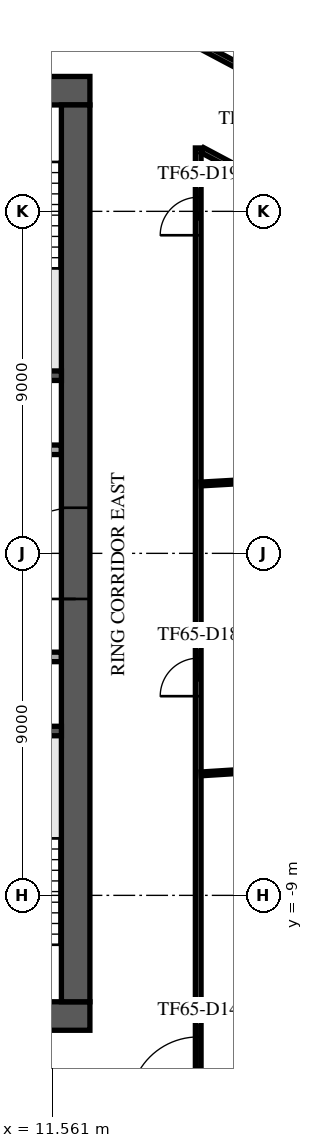
"""IFC4 building model, lengths in metres.
Left out: names, types, materials, properties, quantities, classifications, styles, units other than length and angle.
Written with IfcOpenShell. Run it as: python <this file> out.ifc"""

import sys

from ifc_helpers import new_model, si_unit, direction, frame, frame_2d, origin, place, context, subcontext, project, spatial, rectangle, extrude, element, fill, save


model = new_model("IFC4")
c1 = context("Model", 3, precision=1e-05, world=origin(), true_north=direction((0.0, 1.0)))
c2 = subcontext(c1, "Body", "Model", "MODEL_VIEW")
j1 = project(units=[si_unit("LENGTHUNIT", "METRE"), si_unit("PLANEANGLEUNIT", "RADIAN")], contexts=[c1])
p1 = place(None, origin())
s1 = spatial("IfcSite", under=j1, at=p1, CompositionType="ELEMENT")
p2 = place(p1, origin())
s2 = spatial("IfcBuilding", under=s1, at=p2, CompositionType="ELEMENT")
p3 = place(p2, frame((0.0, 0.0, 274.9)))
s3 = spatial("IfcBuildingStorey", under=s2, at=p3, CompositionType="ELEMENT", Elevation=274.9)
p4 = place(p3, frame((-12.55, 12.175, 0.0), z_axis=(0.0, 0.0, 1.0), x_axis=(1.0, 0.0, 0.0)))
e1 = element("IfcWall", 1, at=p4, inside=s3, PredefinedType="SHEAR", context=c2, shape_type="SweptSolid", body=[
    extrude(rectangle(XDim=25.1, YDim=0.75, at=frame_2d((12.55, 0.0))), origin(), (0.0, 0.0, 1.0), 3.64),
])
p5 = place(p4, frame((11.35, 0.0, 0.0)))
e2 = element("IfcOpeningElement", 2, at=p5, cuts=e1, PredefinedType="OPENING", context=c2, shape_type="SweptSolid", body=[
    extrude(rectangle(XDim=2.4, YDim=2.4, at=frame_2d((1.2, 1.2))), frame((0.0, 0.385, 0.0), z_axis=(0.0, -1.0, 0.0), x_axis=(1.0, 0.0, 0.0)), (0.0, 0.0, 1.0), 0.77),
])
p6 = place(p4, frame((22.175, 0.0, 0.0)))
e3 = element("IfcOpeningElement", 3, at=p6, cuts=e1, PredefinedType="OPENING", context=c2, shape_type="SweptSolid", body=[
    extrude(rectangle(XDim=1.2, YDim=2.1, at=frame_2d((0.6, 1.05))), frame((0.0, 0.385, 0.0), z_axis=(0.0, -1.0, 0.0), x_axis=(1.0, 0.0, 0.0)), (0.0, 0.0, 1.0), 0.77),
])
p7 = place(p4, frame((1.15, 0.0, 0.0)))
e4 = element("IfcOpeningElement", 4, at=p7, cuts=e1, PredefinedType="OPENING", context=c2, shape_type="SweptSolid", body=[
    extrude(rectangle(XDim=1.0, YDim=2.1, at=frame_2d((0.5, 1.05))), frame((0.0, 0.385, 0.0), z_axis=(0.0, -1.0, 0.0), x_axis=(1.0, 0.0, 0.0)), (0.0, 0.0, 1.0), 0.77),
])
p8 = place(p3, frame((-12.55, -12.175, 0.0), z_axis=(0.0, 0.0, 1.0), x_axis=(1.0, 0.0, 0.0)))
e5 = element("IfcWall", 5, at=p8, inside=s3, PredefinedType="SHEAR", context=c2, shape_type="SweptSolid", body=[
    extrude(rectangle(XDim=25.1, YDim=0.75, at=frame_2d((12.55, 0.0))), origin(), (0.0, 0.0, 1.0), 3.64),
])
p9 = place(p8, frame((7.45, 0.0, 0.0)))
e6 = element("IfcOpeningElement", 6, at=p9, cuts=e5, PredefinedType="OPENING", context=c2, shape_type="SweptSolid", body=[
    extrude(rectangle(XDim=2.0, YDim=2.1, at=frame_2d((1.0, 1.05))), frame((0.0, 0.385, 0.0), z_axis=(0.0, -1.0, 0.0), x_axis=(1.0, 0.0, 0.0)), (0.0, 0.0, 1.0), 0.77),
])
p10 = place(p8, frame((17.575, 0.0, 0.0)))
e7 = element("IfcOpeningElement", 7, at=p10, cuts=e5, PredefinedType="OPENING", context=c2, shape_type="SweptSolid", body=[
    extrude(rectangle(XDim=1.2, YDim=2.1, at=frame_2d((0.6, 1.05))), frame((0.0, 0.385, 0.0), z_axis=(0.0, -1.0, 0.0), x_axis=(1.0, 0.0, 0.0)), (0.0, 0.0, 1.0), 0.77),
])
p11 = place(p8, frame((1.725, 0.0, 0.0)))
e8 = element("IfcOpeningElement", 8, at=p11, cuts=e5, PredefinedType="OPENING", context=c2, shape_type="SweptSolid", body=[
    extrude(rectangle(XDim=1.2, YDim=2.1, at=frame_2d((0.6, 1.05))), frame((0.0, 0.385, 0.0), z_axis=(0.0, -1.0, 0.0), x_axis=(1.0, 0.0, 0.0)), (0.0, 0.0, 1.0), 0.77),
])
p12 = place(p8, frame((22.175, 0.0, 0.0)))
e9 = element("IfcOpeningElement", 9, at=p12, cuts=e5, PredefinedType="OPENING", context=c2, shape_type="SweptSolid", body=[
    extrude(rectangle(XDim=1.2, YDim=2.1, at=frame_2d((0.6, 1.05))), frame((0.0, 0.385, 0.0), z_axis=(0.0, -1.0, 0.0), x_axis=(1.0, 0.0, 0.0)), (0.0, 0.0, 1.0), 0.77),
])
p13 = place(p3, frame((12.175, -11.8, 0.0), z_axis=(0.0, 0.0, 1.0), x_axis=(0.0, 1.0, 0.0)))
e10 = element("IfcWall", 10, at=p13, inside=s3, PredefinedType="SHEAR", context=c2, shape_type="SweptSolid", body=[
    extrude(rectangle(XDim=23.6, YDim=0.75, at=frame_2d((11.8, 0.0))), origin(), (0.0, 0.0, 1.0), 3.64),
])
p14 = place(p13, frame((10.6, 0.0, 0.0)))
e11 = element("IfcOpeningElement", 11, at=p14, cuts=e10, PredefinedType="OPENING", context=c2, shape_type="SweptSolid", body=[
    extrude(rectangle(XDim=2.4, YDim=2.4, at=frame_2d((1.2, 1.2))), frame((0.0, 0.385, 0.0), z_axis=(0.0, -1.0, 0.0), x_axis=(1.0, 0.0, 0.0)), (0.0, 0.0, 1.0), 0.77),
])
for number, where, z_axis, x_axis in (
    (12, (8.65, 4.675, 0.0), (0.0, 0.0, 1.0), (1.0, 0.0, 0.0)),
    (13, (8.65, -4.675, 0.0), (0.0, 0.0, 1.0), (1.0, 0.0, 0.0)),
):
    element("IfcWall", number, at=place(p3, frame(where, z_axis=z_axis, x_axis=x_axis)), inside=s3, PredefinedType="SOLIDWALL", context=c2, shape_type="SweptSolid", body=[
        extrude(rectangle(XDim=3.15, YDim=0.25, at=frame_2d((1.575, 0.0))), origin(), (0.0, 0.0, 1.0), 3.64),
    ])
p15 = place(p3, frame((5.63, -2.725, 0.0), z_axis=(0.0, 0.0, 1.0), x_axis=(1.0, 0.0, 0.0)))
e14 = element("IfcWall", 14, at=p15, inside=s3, PredefinedType="PARTITIONING", context=c2, shape_type="SweptSolid", body=[
    extrude(rectangle(XDim=6.165, YDim=0.25, at=frame_2d((3.083, 0.0))), origin(), (0.0, 0.0, 1.0), 3.64),
])
p16 = place(p15, frame((0.745, 0.0, 0.0)))
e15 = element("IfcOpeningElement", 15, at=p16, cuts=e14, PredefinedType="OPENING", context=c2, shape_type="SweptSolid", body=[
    extrude(rectangle(XDim=1.0, YDim=2.1, at=frame_2d((0.5, 1.05))), frame((0.0, 0.135, 0.0), z_axis=(0.0, -1.0, 0.0), x_axis=(1.0, 0.0, 0.0)), (0.0, 0.0, 1.0), 0.27),
])
p17 = place(p15, frame((3.92, 0.0, 0.0)))
e16 = element("IfcOpeningElement", 16, at=p17, cuts=e14, PredefinedType="OPENING", context=c2, shape_type="SweptSolid", body=[
    extrude(rectangle(XDim=0.9, YDim=2.1, at=frame_2d((0.45, 1.05))), frame((0.0, 0.135, 0.0), z_axis=(0.0, -1.0, 0.0), x_axis=(1.0, 0.0, 0.0)), (0.0, 0.0, 1.0), 0.27),
])
p18 = place(p3, frame((-11.795, 2.725, 0.0), z_axis=(0.0, 0.0, 1.0), x_axis=(1.0, 0.0, 0.0)))
e17 = element("IfcWall", 17, at=p18, inside=s3, PredefinedType="PARTITIONING", context=c2, shape_type="SweptSolid", body=[
    extrude(rectangle(XDim=23.59, YDim=0.25, at=frame_2d((11.795, 0.0))), origin(), (0.0, 0.0, 1.0), 3.64),
])
p19 = place(p18, frame((21.345, 0.0, 0.0)))
e18 = element("IfcOpeningElement", 18, at=p19, cuts=e17, PredefinedType="OPENING", context=c2, shape_type="SweptSolid", body=[
    extrude(rectangle(XDim=0.9, YDim=2.1, at=frame_2d((0.45, 1.05))), frame((0.0, 0.135, 0.0), z_axis=(0.0, -1.0, 0.0), x_axis=(1.0, 0.0, 0.0)), (0.0, 0.0, 1.0), 0.27),
])
p20 = place(p18, frame((1.345, 0.0, 0.0)))
e19 = element("IfcOpeningElement", 19, at=p20, cuts=e17, PredefinedType="OPENING", context=c2, shape_type="SweptSolid", body=[
    extrude(rectangle(XDim=0.9, YDim=2.1, at=frame_2d((0.45, 1.05))), frame((0.0, 0.135, 0.0), z_axis=(0.0, -1.0, 0.0), x_axis=(1.0, 0.0, 0.0)), (0.0, 0.0, 1.0), 0.27),
])
p21 = place(p18, frame((4.32, 0.0, 0.0)))
e20 = element("IfcOpeningElement", 20, at=p21, cuts=e17, PredefinedType="OPENING", context=c2, shape_type="SweptSolid", body=[
    extrude(rectangle(XDim=1.2, YDim=2.1, at=frame_2d((0.6, 1.05))), frame((0.0, 0.135, 0.0), z_axis=(0.0, -1.0, 0.0), x_axis=(1.0, 0.0, 0.0)), (0.0, 0.0, 1.0), 0.27),
])
p22 = place(p18, frame((15.42, 0.0, 0.0)))
e21 = element("IfcOpeningElement", 21, at=p22, cuts=e17, PredefinedType="OPENING", context=c2, shape_type="SweptSolid", body=[
    extrude(rectangle(XDim=1.0, YDim=2.1, at=frame_2d((0.5, 1.05))), frame((0.0, 0.135, 0.0), z_axis=(0.0, -1.0, 0.0), x_axis=(1.0, 0.0, 0.0)), (0.0, 0.0, 1.0), 0.27),
])
p23 = place(p3, frame((9.233, -32.479, 0.0), z_axis=(0.0, 0.0, 1.0), x_axis=(0.469468429065, 0.882949259081, 0.0)))
e22 = element("IfcWall", 22, at=p23, inside=s3, PredefinedType="STANDARD", context=c2, shape_type="SweptSolid", body=[
    extrude(rectangle(XDim=48.686, YDim=0.6, at=frame_2d((24.343, 0.0))), origin(), (0.0, 0.0, 1.0), 3.64),
])
p24 = place(p23, frame((1.213, 0.0, 0.9)))
e23 = element("IfcOpeningElement", 23, at=p24, cuts=e22, PredefinedType="OPENING", context=c2, shape_type="SweptSolid", body=[
    extrude(rectangle(XDim=2.0, YDim=2.1, at=frame_2d((1.0, 1.05))), frame((0.0, 0.31, 0.0), z_axis=(0.0, -1.0, 0.0), x_axis=(1.0, 0.0, 0.0)), (0.0, 0.0, 1.0), 0.62),
])
p25 = place(p23, frame((5.639, 0.0, 0.9)))
e24 = element("IfcOpeningElement", 24, at=p25, cuts=e22, PredefinedType="OPENING", context=c2, shape_type="SweptSolid", body=[
    extrude(rectangle(XDim=2.0, YDim=2.1, at=frame_2d((1.0, 1.05))), frame((0.0, 0.31, 0.0), z_axis=(0.0, -1.0, 0.0), x_axis=(1.0, 0.0, 0.0)), (0.0, 0.0, 1.0), 0.62),
])
p26 = place(p23, frame((10.065, 0.0, 0.9)))
e25 = element("IfcOpeningElement", 25, at=p26, cuts=e22, PredefinedType="OPENING", context=c2, shape_type="SweptSolid", body=[
    extrude(rectangle(XDim=2.0, YDim=2.1, at=frame_2d((1.0, 1.05))), frame((0.0, 0.31, 0.0), z_axis=(0.0, -1.0, 0.0), x_axis=(1.0, 0.0, 0.0)), (0.0, 0.0, 1.0), 0.62),
])
p27 = place(p23, frame((14.491, 0.0, 0.9)))
e26 = element("IfcOpeningElement", 26, at=p27, cuts=e22, PredefinedType="OPENING", context=c2, shape_type="SweptSolid", body=[
    extrude(rectangle(XDim=2.0, YDim=2.1, at=frame_2d((1.0, 1.05))), frame((0.0, 0.31, 0.0), z_axis=(0.0, -1.0, 0.0), x_axis=(1.0, 0.0, 0.0)), (0.0, 0.0, 1.0), 0.62),
])
p28 = place(p23, frame((18.917, 0.0, 0.9)))
e27 = element("IfcOpeningElement", 27, at=p28, cuts=e22, PredefinedType="OPENING", context=c2, shape_type="SweptSolid", body=[
    extrude(rectangle(XDim=2.0, YDim=2.1, at=frame_2d((1.0, 1.05))), frame((0.0, 0.31, 0.0), z_axis=(0.0, -1.0, 0.0), x_axis=(1.0, 0.0, 0.0)), (0.0, 0.0, 1.0), 0.62),
])
p29 = place(p23, frame((23.343, 0.0, 0.9)))
e28 = element("IfcOpeningElement", 28, at=p29, cuts=e22, PredefinedType="OPENING", context=c2, shape_type="SweptSolid", body=[
    extrude(rectangle(XDim=2.0, YDim=2.1, at=frame_2d((1.0, 1.05))), frame((0.0, 0.31, 0.0), z_axis=(0.0, -1.0, 0.0), x_axis=(1.0, 0.0, 0.0)), (0.0, 0.0, 1.0), 0.62),
])
p30 = place(p23, frame((27.769, 0.0, 0.9)))
e29 = element("IfcOpeningElement", 29, at=p30, cuts=e22, PredefinedType="OPENING", context=c2, shape_type="SweptSolid", body=[
    extrude(rectangle(XDim=2.0, YDim=2.1, at=frame_2d((1.0, 1.05))), frame((0.0, 0.31, 0.0), z_axis=(0.0, -1.0, 0.0), x_axis=(1.0, 0.0, 0.0)), (0.0, 0.0, 1.0), 0.62),
])
p31 = place(p23, frame((32.195, 0.0, 0.9)))
e30 = element("IfcOpeningElement", 30, at=p31, cuts=e22, PredefinedType="OPENING", context=c2, shape_type="SweptSolid", body=[
    extrude(rectangle(XDim=2.0, YDim=2.1, at=frame_2d((1.0, 1.05))), frame((0.0, 0.31, 0.0), z_axis=(0.0, -1.0, 0.0), x_axis=(1.0, 0.0, 0.0)), (0.0, 0.0, 1.0), 0.62),
])
p32 = place(p23, frame((36.621, 0.0, 0.9)))
e31 = element("IfcOpeningElement", 31, at=p32, cuts=e22, PredefinedType="OPENING", context=c2, shape_type="SweptSolid", body=[
    extrude(rectangle(XDim=2.0, YDim=2.1, at=frame_2d((1.0, 1.05))), frame((0.0, 0.31, 0.0), z_axis=(0.0, -1.0, 0.0), x_axis=(1.0, 0.0, 0.0)), (0.0, 0.0, 1.0), 0.62),
])
p33 = place(p23, frame((41.047, 0.0, 0.9)))
e32 = element("IfcOpeningElement", 32, at=p33, cuts=e22, PredefinedType="OPENING", context=c2, shape_type="SweptSolid", body=[
    extrude(rectangle(XDim=2.0, YDim=2.1, at=frame_2d((1.0, 1.05))), frame((0.0, 0.31, 0.0), z_axis=(0.0, -1.0, 0.0), x_axis=(1.0, 0.0, 0.0)), (0.0, 0.0, 1.0), 0.62),
])
p34 = place(p23, frame((45.473, 0.0, 0.9)))
e33 = element("IfcOpeningElement", 33, at=p34, cuts=e22, PredefinedType="OPENING", context=c2, shape_type="SweptSolid", body=[
    extrude(rectangle(XDim=2.0, YDim=2.1, at=frame_2d((1.0, 1.05))), frame((0.0, 0.31, 0.0), z_axis=(0.0, -1.0, 0.0), x_axis=(1.0, 0.0, 0.0)), (0.0, 0.0, 1.0), 0.62),
])
p35 = place(p3, frame((-8.385, 26.033, 0.0), z_axis=(0.0, 0.0, 1.0), x_axis=(0.882949433839, -0.46946810039, 0.0)))
e34 = element("IfcWall", 34, at=p35, inside=s3, PredefinedType="PARTITIONING", context=c2, shape_type="SweptSolid", body=[
    extrude(rectangle(XDim=39.325, YDim=0.15, at=frame_2d((19.662, 0.0))), origin(), (0.0, 0.0, 1.0), 3.04),
])
p36 = place(p35, frame((10.622, 0.0, 0.0)))
e35 = element("IfcOpeningElement", 35, at=p36, cuts=e34, PredefinedType="OPENING", context=c2, shape_type="SweptSolid", body=[
    extrude(rectangle(XDim=1.0, YDim=2.1, at=frame_2d((0.5, 1.05))), frame((0.0, 0.085, 0.0), z_axis=(0.0, -1.0, 0.0), x_axis=(1.0, 0.0, 0.0)), (0.0, 0.0, 1.0), 0.17),
])
p37 = place(p35, frame((16.615, 0.0, 0.0)))
e36 = element("IfcOpeningElement", 36, at=p37, cuts=e34, PredefinedType="OPENING", context=c2, shape_type="SweptSolid", body=[
    extrude(rectangle(XDim=1.0, YDim=2.1, at=frame_2d((0.5, 1.05))), frame((0.0, 0.085, 0.0), z_axis=(0.0, -1.0, 0.0), x_axis=(1.0, 0.0, 0.0)), (0.0, 0.0, 1.0), 0.17),
])
p38 = place(p35, frame((28.254, 0.0, 0.0)))
e37 = element("IfcOpeningElement", 37, at=p38, cuts=e34, PredefinedType="OPENING", context=c2, shape_type="SweptSolid", body=[
    extrude(rectangle(XDim=1.0, YDim=2.1, at=frame_2d((0.5, 1.05))), frame((0.0, 0.085, 0.0), z_axis=(0.0, -1.0, 0.0), x_axis=(1.0, 0.0, 0.0)), (0.0, 0.0, 1.0), 0.17),
])
p39 = place(p3, frame((15.4, -15.325, 0.0), z_axis=(0.0, 0.0, 1.0), x_axis=(0.0, 1.0, 0.0)))
e38 = element("IfcWall", 38, at=p39, inside=s3, PredefinedType="PARTITIONING", context=c2, shape_type="SweptSolid", body=[
    extrude(rectangle(XDim=25.993, YDim=0.15, at=frame_2d((12.997, 0.0))), origin(), (0.0, 0.0, 1.0), 3.24),
])
p40 = place(p39, frame((0.8, 0.0, 0.0)))
e39 = element("IfcOpeningElement", 39, at=p40, cuts=e38, PredefinedType="OPENING", context=c2, shape_type="SweptSolid", body=[
    extrude(rectangle(XDim=1.8, YDim=2.1, at=frame_2d((0.9, 1.05))), frame((0.0, 0.085, 0.0), z_axis=(0.0, -1.0, 0.0), x_axis=(1.0, 0.0, 0.0)), (0.0, 0.0, 1.0), 0.17),
])
p41 = place(p39, frame((11.567, 0.0, 0.0)))
e40 = element("IfcOpeningElement", 40, at=p41, cuts=e38, PredefinedType="OPENING", context=c2, shape_type="SweptSolid", body=[
    extrude(rectangle(XDim=1.0, YDim=2.1, at=frame_2d((0.5, 1.05))), frame((0.0, 0.085, 0.0), z_axis=(0.0, -1.0, 0.0), x_axis=(1.0, 0.0, 0.0)), (0.0, 0.0, 1.0), 0.17),
])
p42 = place(p39, frame((23.696, 0.0, 0.0)))
e41 = element("IfcOpeningElement", 41, at=p42, cuts=e38, PredefinedType="OPENING", context=c2, shape_type="SweptSolid", body=[
    extrude(rectangle(XDim=1.0, YDim=2.1, at=frame_2d((0.5, 1.05))), frame((0.0, 0.085, 0.0), z_axis=(0.0, -1.0, 0.0), x_axis=(1.0, 0.0, 0.0)), (0.0, 0.0, 1.0), 0.17),
])
p43 = place(p3, frame((15.51, 10.609, 0.0), z_axis=(0.0, 0.0, 1.0), x_axis=(0.882945895242, -0.469474755525, 0.0)))
e42 = element("IfcWall", 42, at=p43, inside=s3, PredefinedType="PARTITIONING", context=c2, shape_type="SweptSolid", body=[
    extrude(rectangle(XDim=10.986, YDim=0.15, at=frame_2d((5.493, 0.0))), origin(), (0.0, 0.0, 1.0), 3.24),
])
p44 = place(p3, frame((15.478, -5.803, 0.0), z_axis=(0.0, 0.0, 1.0), x_axis=(0.9980255857, 0.062808680043, 0.0)))
e43 = element("IfcWall", 43, at=p44, inside=s3, PredefinedType="PARTITIONING", context=c2, shape_type="SweptSolid", body=[
    extrude(rectangle(XDim=7.875, YDim=0.1, at=frame_2d((3.938, 0.0))), origin(), (0.0, 0.0, 1.0), 3.04),
])
p45 = place(p3, frame((15.478, 1.825, 0.0), z_axis=(0.0, 0.0, 1.0), x_axis=(0.998373479071, 0.057012246819, 0.0)))
e44 = element("IfcWall", 44, at=p45, inside=s3, PredefinedType="PARTITIONING", context=c2, shape_type="SweptSolid", body=[
    extrude(rectangle(XDim=12.037, YDim=0.1, at=frame_2d((6.019, 0.0))), origin(), (0.0, 0.0, 1.0), 3.04),
])
p46 = place(p14, origin())
e45 = element("IfcDoor", 45, at=p46, inside=s3, OperationType="SINGLE_SWING_LEFT", PredefinedType="DOOR", context=c2, shape_type="SweptSolid", body=[
    extrude(rectangle(XDim=2.4, YDim=2.4, at=frame_2d((1.2, 1.2))), frame((0.0, 0.025, 0.0), z_axis=(0.0, -1.0, 0.0), x_axis=(1.0, 0.0, 0.0)), (0.0, 0.0, 1.0), 0.05),
])
fill(e11, e45)
p47 = place(p40, frame((1.8, 0.0, 0.0), z_axis=(0.0, 0.0, 1.0), x_axis=(-1.0, 0.0, 0.0)))
e46 = element("IfcDoor", 46, at=p47, inside=s3, OperationType="DOUBLE_DOOR_SINGLE_SWING", PredefinedType="DOOR", context=c2, shape_type="SweptSolid", body=[
    extrude(rectangle(XDim=1.8, YDim=2.1, at=frame_2d((0.9, 1.05))), frame((0.0, 0.025, 0.0), z_axis=(0.0, -1.0, 0.0), x_axis=(1.0, 0.0, 0.0)), (0.0, 0.0, 1.0), 0.05),
])
fill(e39, e46)
p48 = place(p41, frame((1.0, 0.0, 0.0), z_axis=(0.0, 0.0, 1.0), x_axis=(-1.0, 0.0, 0.0)))
e47 = element("IfcDoor", 47, at=p48, inside=s3, OperationType="SINGLE_SWING_RIGHT", PredefinedType="DOOR", context=c2, shape_type="SweptSolid", body=[
    extrude(rectangle(XDim=1.0, YDim=2.1, at=frame_2d((0.5, 1.05))), frame((0.0, 0.025, 0.0), z_axis=(0.0, -1.0, 0.0), x_axis=(1.0, 0.0, 0.0)), (0.0, 0.0, 1.0), 0.05),
])
fill(e40, e47)
p49 = place(p42, frame((1.0, 0.0, 0.0), z_axis=(0.0, 0.0, 1.0), x_axis=(-1.0, 0.0, 0.0)))
e48 = element("IfcDoor", 48, at=p49, inside=s3, OperationType="SINGLE_SWING_LEFT", PredefinedType="DOOR", context=c2, shape_type="SweptSolid", body=[
    extrude(rectangle(XDim=1.0, YDim=2.1, at=frame_2d((0.5, 1.05))), frame((0.0, 0.025, 0.0), z_axis=(0.0, -1.0, 0.0), x_axis=(1.0, 0.0, 0.0)), (0.0, 0.0, 1.0), 0.05),
])
fill(e41, e48)
save(model, sys.argv[1])
